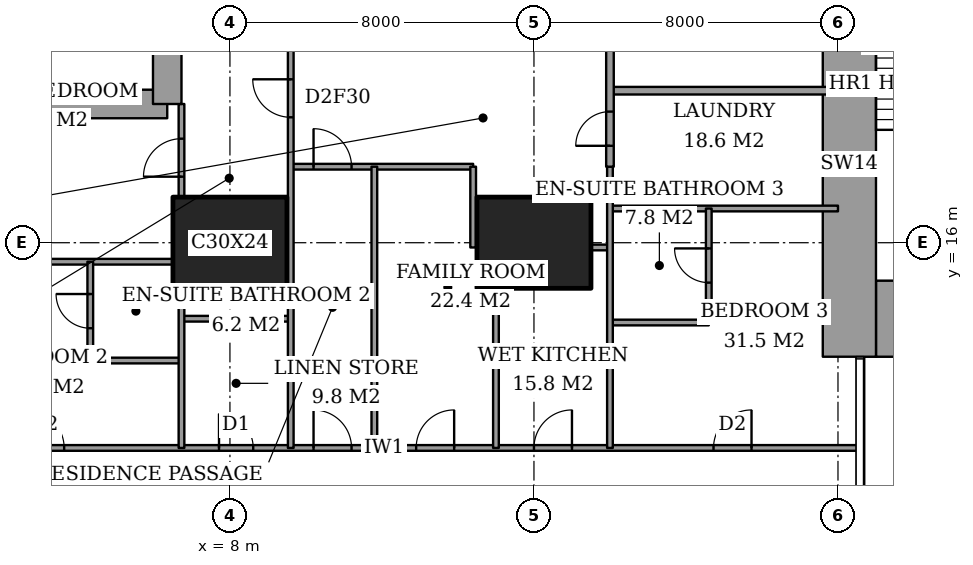
"""IFC4 building model, lengths in metres.
Left out: names, types, materials, properties, quantities, classifications, styles, units other than length and angle.
Written with IfcOpenShell. Run it as: python <this file> out.ifc"""

import sys

from ifc_helpers import new_model, si_unit, direction, frame, frame_2d, origin, origin_2d, place, context, subcontext, project, spatial, rectangle, extrude, element, fill, save


model = new_model("IFC4")
c1 = context("Model", 3, precision=1e-05, world=origin(), true_north=direction((0.0, 1.0)))
c2 = subcontext(c1, "Body", "Model", "MODEL_VIEW")
j1 = project(units=[si_unit("LENGTHUNIT", "METRE"), si_unit("PLANEANGLEUNIT", "RADIAN")], contexts=[c1])
p1 = place(None, origin())
s1 = spatial("IfcSite", under=j1, at=p1, CompositionType="ELEMENT")
p2 = place(p1, origin())
s2 = spatial("IfcBuilding", under=s1, at=p2, CompositionType="ELEMENT")
p3 = place(p2, frame((0.0, 0.0, 58.4)))
s3 = spatial("IfcBuildingStorey", under=s2, at=p3, CompositionType="ELEMENT", Elevation=58.4)
for number, where, z_axis, x_axis in (
    (1, (8.0, 16.0, 0.0), (0.0, 0.0, 1.0), (1.0, 0.0, 0.0)),
    (2, (16.0, 16.0, 0.0), (0.0, 0.0, 1.0), (1.0, 0.0, 0.0)),
):
    element("IfcColumn", number, at=place(p3, frame(where, z_axis=z_axis, x_axis=x_axis)), inside=s3, PredefinedType="COLUMN", context=c2, shape_type="SweptSolid", body=[
        extrude(rectangle(XDim=3.0, YDim=2.4, at=origin_2d()), origin(), (0.0, 0.0, 1.0), 3.6),
    ])
p4 = place(p3, frame((25.0, 14.0, 0.0), z_axis=(0.0, 0.0, 1.0), x_axis=(1.0, 0.0, 0.0)))
e3 = element("IfcWall", 3, at=p4, inside=s3, PredefinedType="SHEAR", context=c2, shape_type="SweptSolid", body=[
    extrude(rectangle(XDim=3.15, YDim=2.0, at=frame_2d((1.575, 0.0))), origin(), (0.0, 0.0, 1.0), 3.6),
])
p5 = place(p3, frame((24.3, 13.0, 0.0), z_axis=(0.0, 0.0, 1.0), x_axis=(0.0, 1.0, 0.0)))
e4 = element("IfcWall", 4, at=p5, inside=s3, PredefinedType="SHEAR", context=c2, shape_type="SweptSolid", body=[
    extrude(rectangle(XDim=10.15, YDim=1.4, at=frame_2d((5.075, 0.0))), origin(), (0.0, 0.0, 1.0), 3.6),
])
p6 = place(p3, frame((1.9, 19.65, 0.0), z_axis=(0.0, 0.0, 1.0), x_axis=(1.0, 0.0, 0.0)))
e5 = element("IfcWall", 5, at=p6, inside=s3, PredefinedType="SHEAR", context=c2, shape_type="SweptSolid", body=[
    extrude(rectangle(XDim=4.45, YDim=0.75, at=frame_2d((2.225, 0.0))), origin(), (0.0, 0.0, 1.0), 3.6),
])
p7 = place(p3, frame((6.35, 19.65, 0.0), z_axis=(0.0, 0.0, 1.0), x_axis=(0.0, 1.0, 0.0)))
e6 = element("IfcWall", 6, at=p7, inside=s3, PredefinedType="SHEAR", context=c2, shape_type="SweptSolid", body=[
    extrude(rectangle(XDim=8.7, YDim=0.75, at=frame_2d((4.35, 0.0))), origin(), (0.0, 0.0, 1.0), 3.6),
])
p8 = place(p7, frame((6.725, 0.0, 0.0)))
e7 = element("IfcOpeningElement", 7, at=p8, cuts=e6, PredefinedType="OPENING", context=c2, shape_type="SweptSolid", body=[
    extrude(rectangle(XDim=1.0, YDim=2.1, at=frame_2d((0.5, 1.05))), frame((0.0, 0.385, 0.0), z_axis=(0.0, -1.0, 0.0), x_axis=(1.0, 0.0, 0.0)), (0.0, 0.0, 1.0), 0.77),
])
p9 = place(p3, frame((-0.45, 10.6, 0.0), z_axis=(0.0, 0.0, 1.0), x_axis=(1.0, 0.0, 0.0)))
e8 = element("IfcWall", 8, at=p9, inside=s3, PredefinedType="PARTITIONING", context=c2, shape_type="SweptSolid", body=[
    extrude(rectangle(XDim=25.011, YDim=0.15, at=frame_2d((12.505, 0.0))), origin(), (0.0, 0.0, 1.0), 3.35),
])
p10 = place(p9, frame((10.65, 0.0, 0.0)))
e9 = element("IfcOpeningElement", 9, at=p10, cuts=e8, PredefinedType="OPENING", context=c2, shape_type="SweptSolid", body=[
    extrude(rectangle(XDim=1.0, YDim=2.1, at=frame_2d((0.5, 1.05))), frame((0.0, 0.085, 0.0), z_axis=(0.0, -1.0, 0.0), x_axis=(1.0, 0.0, 0.0)), (0.0, 0.0, 1.0), 0.17),
])
p11 = place(p9, frame((3.087, 0.0, 0.0)))
e10 = element("IfcOpeningElement", 10, at=p11, cuts=e8, PredefinedType="OPENING", context=c2, shape_type="SweptSolid", body=[
    extrude(rectangle(XDim=1.0, YDim=2.1, at=frame_2d((0.5, 1.05))), frame((0.0, 0.085, 0.0), z_axis=(0.0, -1.0, 0.0), x_axis=(1.0, 0.0, 0.0)), (0.0, 0.0, 1.0), 0.17),
])
p12 = place(p9, frame((8.163, 0.0, 0.0)))
e11 = element("IfcOpeningElement", 11, at=p12, cuts=e8, PredefinedType="OPENING", context=c2, shape_type="SweptSolid", body=[
    extrude(rectangle(XDim=0.9, YDim=2.1, at=frame_2d((0.45, 1.05))), frame((0.0, 0.085, 0.0), z_axis=(0.0, -1.0, 0.0), x_axis=(1.0, 0.0, 0.0)), (0.0, 0.0, 1.0), 0.17),
])
p13 = place(p9, frame((13.35, 0.0, 0.0)))
e12 = element("IfcOpeningElement", 12, at=p13, cuts=e8, PredefinedType="OPENING", context=c2, shape_type="SweptSolid", body=[
    extrude(rectangle(XDim=1.0, YDim=2.1, at=frame_2d((0.5, 1.05))), frame((0.0, 0.085, 0.0), z_axis=(0.0, -1.0, 0.0), x_axis=(1.0, 0.0, 0.0)), (0.0, 0.0, 1.0), 0.17),
])
p14 = place(p9, frame((16.45, 0.0, 0.0)))
e13 = element("IfcOpeningElement", 13, at=p14, cuts=e8, PredefinedType="OPENING", context=c2, shape_type="SweptSolid", body=[
    extrude(rectangle(XDim=1.0, YDim=2.1, at=frame_2d((0.5, 1.05))), frame((0.0, 0.085, 0.0), z_axis=(0.0, -1.0, 0.0), x_axis=(1.0, 0.0, 0.0)), (0.0, 0.0, 1.0), 0.17),
])
p15 = place(p9, frame((21.175, 0.0, 0.0)))
e14 = element("IfcOpeningElement", 14, at=p15, cuts=e8, PredefinedType="OPENING", context=c2, shape_type="SweptSolid", body=[
    extrude(rectangle(XDim=1.0, YDim=2.1, at=frame_2d((0.5, 1.05))), frame((0.0, 0.085, 0.0), z_axis=(0.0, -1.0, 0.0), x_axis=(1.0, 0.0, 0.0)), (0.0, 0.0, 1.0), 0.17),
])
p16 = place(p3, frame((4.325, 12.9, 0.0), z_axis=(0.0, 0.0, 1.0), x_axis=(1.0, 0.0, 0.0)))
e15 = element("IfcWall", 15, at=p16, inside=s3, PredefinedType="PARTITIONING", context=c2, shape_type="SweptSolid", body=[
    extrude(rectangle(XDim=2.4, YDim=0.15, at=frame_2d((1.2, 0.0))), origin(), (0.0, 0.0, 1.0), 3.35),
])
p17 = place(p3, frame((18.0, 13.9, 0.0), z_axis=(0.0, 0.0, 1.0), x_axis=(1.0, 0.0, 0.0)))
e16 = element("IfcWall", 16, at=p17, inside=s3, PredefinedType="PARTITIONING", context=c2, shape_type="SweptSolid", body=[
    extrude(rectangle(XDim=2.6, YDim=0.15, at=frame_2d((1.3, 0.0))), origin(), (0.0, 0.0, 1.0), 3.35),
])
p18 = place(p3, frame((6.725, 14.0, 0.0), z_axis=(0.0, 0.0, 1.0), x_axis=(1.0, 0.0, 0.0)))
e17 = element("IfcWall", 17, at=p18, inside=s3, PredefinedType="PARTITIONING", context=c2, shape_type="SweptSolid", body=[
    extrude(rectangle(XDim=2.875, YDim=0.15, at=frame_2d((1.438, 0.0))), origin(), (0.0, 0.0, 1.0), 3.35),
])
p19 = place(p3, frame((1.35, 15.5, 0.0), z_axis=(0.0, 0.0, 1.0), x_axis=(1.0, 0.0, 0.0)))
e18 = element("IfcWall", 18, at=p19, inside=s3, PredefinedType="PARTITIONING", context=c2, shape_type="SweptSolid", body=[
    extrude(rectangle(XDim=5.15, YDim=0.15, at=frame_2d((2.575, 0.0))), origin(), (0.0, 0.0, 1.0), 3.35),
])
p20 = place(p3, frame((17.5, 15.875, 0.0), z_axis=(0.0, 0.0, 1.0), x_axis=(1.0, 0.0, 0.0)))
e19 = element("IfcWall", 19, at=p20, inside=s3, PredefinedType="PARTITIONING", context=c2, shape_type="SweptSolid", body=[
    extrude(rectangle(XDim=0.5, YDim=0.15, at=frame_2d((0.25, 0.0))), origin(), (0.0, 0.0, 1.0), 2.634),
])
p21 = place(p3, frame((18.0, 16.9, 0.0), z_axis=(0.0, 0.0, 1.0), x_axis=(1.0, 0.0, 0.0)))
e20 = element("IfcWall", 20, at=p21, inside=s3, PredefinedType="PARTITIONING", context=c2, shape_type="SweptSolid", body=[
    extrude(rectangle(XDim=6.0, YDim=0.15, at=frame_2d((3.0, 0.0))), origin(), (0.0, 0.0, 1.0), 3.35),
])
p22 = place(p3, frame((9.6, 18.0, 0.0), z_axis=(0.0, 0.0, 1.0), x_axis=(1.0, 0.0, 0.0)))
e21 = element("IfcWall", 21, at=p22, inside=s3, PredefinedType="PARTITIONING", context=c2, shape_type="SweptSolid", body=[
    extrude(rectangle(XDim=4.8, YDim=0.15, at=frame_2d((2.4, 0.0))), origin(), (0.0, 0.0, 1.0), 3.35),
])
p23 = place(p22, frame((0.6, 0.0, 0.0)))
e22 = element("IfcOpeningElement", 22, at=p23, cuts=e21, PredefinedType="OPENING", context=c2, shape_type="SweptSolid", body=[
    extrude(rectangle(XDim=1.0, YDim=2.1, at=frame_2d((0.5, 1.05))), frame((0.0, 0.085, 0.0), z_axis=(0.0, -1.0, 0.0), x_axis=(1.0, 0.0, 0.0)), (0.0, 0.0, 1.0), 0.17),
])
p24 = place(p3, frame((18.0, 20.0, 0.0), z_axis=(0.0, 0.0, 1.0), x_axis=(1.0, 0.0, 0.0)))
e23 = element("IfcWall", 23, at=p24, inside=s3, PredefinedType="PARTITIONING", context=c2, shape_type="SweptSolid", body=[
    extrude(rectangle(XDim=6.0, YDim=0.2, at=frame_2d((3.0, 0.0))), origin(), (0.0, 0.0, 1.0), 3.35),
])
p25 = place(p3, frame((4.325, 12.9, 0.0), z_axis=(0.0, 0.0, 1.0), x_axis=(0.0, 1.0, 0.0)))
e24 = element("IfcWall", 24, at=p25, inside=s3, PredefinedType="PARTITIONING", context=c2, shape_type="SweptSolid", body=[
    extrude(rectangle(XDim=2.6, YDim=0.15, at=frame_2d((1.3, 0.0))), origin(), (0.0, 0.0, 1.0), 3.35),
])
p26 = place(p25, frame((0.85, 0.0, 0.0)))
e25 = element("IfcOpeningElement", 25, at=p26, cuts=e24, PredefinedType="OPENING", context=c2, shape_type="SweptSolid", body=[
    extrude(rectangle(XDim=0.9, YDim=2.1, at=frame_2d((0.45, 1.05))), frame((0.0, 0.085, 0.0), z_axis=(0.0, -1.0, 0.0), x_axis=(1.0, 0.0, 0.0)), (0.0, 0.0, 1.0), 0.17),
])
p27 = place(p3, frame((6.725, 10.6, 0.0), z_axis=(0.0, 0.0, 1.0), x_axis=(0.0, 1.0, 0.0)))
e26 = element("IfcWall", 26, at=p27, inside=s3, PredefinedType="PARTITIONING", context=c2, shape_type="SweptSolid", body=[
    extrude(rectangle(XDim=4.2, YDim=0.15, at=frame_2d((2.1, 0.0))), origin(), (0.0, 0.0, 1.0), 3.35),
])
p28 = place(p3, frame((6.725, 17.2, 0.0), z_axis=(0.0, 0.0, 1.0), x_axis=(0.0, 1.0, 0.0)))
e27 = element("IfcWall", 27, at=p28, inside=s3, PredefinedType="PARTITIONING", context=c2, shape_type="SweptSolid", body=[
    extrude(rectangle(XDim=2.45, YDim=0.15, at=frame_2d((1.225, 0.0))), origin(), (0.0, 0.0, 1.0), 3.35),
])
p29 = place(p28, frame((0.538, 0.0, 0.0)))
e28 = element("IfcOpeningElement", 28, at=p29, cuts=e27, PredefinedType="OPENING", context=c2, shape_type="SweptSolid", body=[
    extrude(rectangle(XDim=1.0, YDim=2.1, at=frame_2d((0.5, 1.05))), frame((0.0, 0.085, 0.0), z_axis=(0.0, -1.0, 0.0), x_axis=(1.0, 0.0, 0.0)), (0.0, 0.0, 1.0), 0.17),
])
p30 = place(p3, frame((9.6, 10.6, 0.0), z_axis=(0.0, 0.0, 1.0), x_axis=(0.0, 1.0, 0.0)))
e29 = element("IfcWall", 29, at=p30, inside=s3, PredefinedType="PARTITIONING", context=c2, shape_type="SweptSolid", body=[
    extrude(rectangle(XDim=11.0, YDim=0.15, at=frame_2d((5.5, 0.0))), origin(), (0.0, 0.0, 1.0), 3.35),
])
p31 = place(p30, frame((8.7, 0.0, 0.0)))
e30 = element("IfcOpeningElement", 30, at=p31, cuts=e29, PredefinedType="OPENING", context=c2, shape_type="SweptSolid", body=[
    extrude(rectangle(XDim=1.0, YDim=2.1, at=frame_2d((0.5, 1.05))), frame((0.0, 0.085, 0.0), z_axis=(0.0, -1.0, 0.0), x_axis=(1.0, 0.0, 0.0)), (0.0, 0.0, 1.0), 0.17),
])
p32 = place(p3, frame((11.8, 10.6, 0.0), z_axis=(0.0, 0.0, 1.0), x_axis=(0.0, 1.0, 0.0)))
e31 = element("IfcWall", 31, at=p32, inside=s3, PredefinedType="PARTITIONING", context=c2, shape_type="SweptSolid", body=[
    extrude(rectangle(XDim=7.4, YDim=0.15, at=frame_2d((3.7, 0.0))), origin(), (0.0, 0.0, 1.0), 3.35),
])
p33 = place(p3, frame((14.4, 15.875, 0.0), z_axis=(0.0, 0.0, 1.0), x_axis=(0.0, 1.0, 0.0)))
e32 = element("IfcWall", 32, at=p33, inside=s3, PredefinedType="PARTITIONING", context=c2, shape_type="SweptSolid", body=[
    extrude(rectangle(XDim=2.125, YDim=0.15, at=frame_2d((1.062, 0.0))), origin(), (0.0, 0.0, 1.0), 3.35),
])
p34 = place(p3, frame((15.0, 10.6, 0.0), z_axis=(0.0, 0.0, 1.0), x_axis=(0.0, 1.0, 0.0)))
e33 = element("IfcWall", 33, at=p34, inside=s3, PredefinedType="PARTITIONING", context=c2, shape_type="SweptSolid", body=[
    extrude(rectangle(XDim=4.2, YDim=0.15, at=frame_2d((2.1, 0.0))), origin(), (0.0, 0.0, 1.0), 3.35),
])
p35 = place(p3, frame((18.0, 18.0, 0.0), z_axis=(0.0, 0.0, 1.0), x_axis=(0.0, 1.0, 0.0)))
e34 = element("IfcWall", 34, at=p35, inside=s3, PredefinedType="PARTITIONING", context=c2, shape_type="SweptSolid", body=[
    extrude(rectangle(XDim=6.0, YDim=0.2, at=frame_2d((3.0, 0.0))), origin(), (0.0, 0.0, 1.0), 3.35),
])
p36 = place(p35, frame((3.4, 0.0, 0.0)))
e35 = element("IfcOpeningElement", 35, at=p36, cuts=e34, PredefinedType="OPENING", context=c2, shape_type="SweptSolid", body=[
    extrude(rectangle(XDim=1.2, YDim=2.4, at=frame_2d((0.6, 1.2))), frame((0.0, 0.11, 0.0), z_axis=(0.0, -1.0, 0.0), x_axis=(1.0, 0.0, 0.0)), (0.0, 0.0, 1.0), 0.22),
])
p37 = place(p35, frame((0.55, 0.0, 0.0)))
e36 = element("IfcOpeningElement", 36, at=p37, cuts=e34, PredefinedType="OPENING", context=c2, shape_type="SweptSolid", body=[
    extrude(rectangle(XDim=0.9, YDim=2.1, at=frame_2d((0.45, 1.05))), frame((0.0, 0.11, 0.0), z_axis=(0.0, -1.0, 0.0), x_axis=(1.0, 0.0, 0.0)), (0.0, 0.0, 1.0), 0.22),
])
p38 = place(p3, frame((18.0, 10.6, 0.0), z_axis=(0.0, 0.0, 1.0), x_axis=(0.0, 1.0, 0.0)))
e37 = element("IfcWall", 37, at=p38, inside=s3, PredefinedType="PARTITIONING", context=c2, shape_type="SweptSolid", body=[
    extrude(rectangle(XDim=7.4, YDim=0.15, at=frame_2d((3.7, 0.0))), origin(), (0.0, 0.0, 1.0), 3.35),
])
p39 = place(p3, frame((20.6, 13.9, 0.0), z_axis=(0.0, 0.0, 1.0), x_axis=(0.0, 1.0, 0.0)))
e38 = element("IfcWall", 38, at=p39, inside=s3, PredefinedType="PARTITIONING", context=c2, shape_type="SweptSolid", body=[
    extrude(rectangle(XDim=3.0, YDim=0.15, at=frame_2d((1.5, 0.0))), origin(), (0.0, 0.0, 1.0), 3.35),
])
p40 = place(p39, frame((1.05, 0.0, 0.0)))
e39 = element("IfcOpeningElement", 39, at=p40, cuts=e38, PredefinedType="OPENING", context=c2, shape_type="SweptSolid", body=[
    extrude(rectangle(XDim=0.9, YDim=2.1, at=frame_2d((0.45, 1.05))), frame((0.0, 0.085, 0.0), z_axis=(0.0, -1.0, 0.0), x_axis=(1.0, 0.0, 0.0)), (0.0, 0.0, 1.0), 0.17),
])
p41 = place(p10, origin())
e40 = element("IfcDoor", 40, at=p41, inside=s3, OperationType="SINGLE_SWING_RIGHT", PredefinedType="DOOR", context=c2, shape_type="SweptSolid", body=[
    extrude(rectangle(XDim=1.0, YDim=2.1, at=frame_2d((0.5, 1.05))), frame((0.0, 0.025, 0.0), z_axis=(0.0, -1.0, 0.0), x_axis=(1.0, 0.0, 0.0)), (0.0, 0.0, 1.0), 0.05),
])
fill(e9, e40)
p42 = place(p26, origin())
e41 = element("IfcDoor", 41, at=p42, inside=s3, OperationType="SINGLE_SWING_LEFT", PredefinedType="DOOR", context=c2, shape_type="SweptSolid", body=[
    extrude(rectangle(XDim=0.9, YDim=2.1, at=frame_2d((0.45, 1.05))), frame((0.0, 0.025, 0.0), z_axis=(0.0, -1.0, 0.0), x_axis=(1.0, 0.0, 0.0)), (0.0, 0.0, 1.0), 0.05),
])
fill(e25, e41)
p43 = place(p11, origin())
e42 = element("IfcDoor", 42, at=p43, inside=s3, OperationType="SINGLE_SWING_RIGHT", PredefinedType="DOOR", context=c2, shape_type="SweptSolid", body=[
    extrude(rectangle(XDim=1.0, YDim=2.1, at=frame_2d((0.5, 1.05))), frame((0.0, 0.025, 0.0), z_axis=(0.0, -1.0, 0.0), x_axis=(1.0, 0.0, 0.0)), (0.0, 0.0, 1.0), 0.05),
])
fill(e10, e42)
p44 = place(p29, origin())
e43 = element("IfcDoor", 43, at=p44, inside=s3, OperationType="SINGLE_SWING_RIGHT", PredefinedType="DOOR", context=c2, shape_type="SweptSolid", body=[
    extrude(rectangle(XDim=1.0, YDim=2.1, at=frame_2d((0.5, 1.05))), frame((0.0, 0.025, 0.0), z_axis=(0.0, -1.0, 0.0), x_axis=(1.0, 0.0, 0.0)), (0.0, 0.0, 1.0), 0.05),
])
fill(e28, e43)
p45 = place(p12, origin())
e44 = element("IfcDoor", 44, at=p45, inside=s3, OperationType="SINGLE_SWING_RIGHT", PredefinedType="DOOR", context=c2, shape_type="SweptSolid", body=[
    extrude(rectangle(XDim=0.9, YDim=2.1, at=frame_2d((0.45, 1.05))), frame((0.0, 0.025, 0.0), z_axis=(0.0, -1.0, 0.0), x_axis=(1.0, 0.0, 0.0)), (0.0, 0.0, 1.0), 0.05),
])
fill(e11, e44)
p46 = place(p31, origin())
e45 = element("IfcDoor", 45, at=p46, inside=s3, OperationType="SINGLE_SWING_LEFT", PredefinedType="DOOR", context=c2, shape_type="SweptSolid", body=[
    extrude(rectangle(XDim=1.0, YDim=2.1, at=frame_2d((0.5, 1.05))), frame((0.0, 0.025, 0.0), z_axis=(0.0, -1.0, 0.0), x_axis=(1.0, 0.0, 0.0)), (0.0, 0.0, 1.0), 0.05),
])
fill(e30, e45)
p47 = place(p23, origin())
e46 = element("IfcDoor", 46, at=p47, inside=s3, OperationType="SINGLE_SWING_RIGHT", PredefinedType="DOOR", context=c2, shape_type="SweptSolid", body=[
    extrude(rectangle(XDim=1.0, YDim=2.1, at=frame_2d((0.5, 1.05))), frame((0.0, 0.025, 0.0), z_axis=(0.0, -1.0, 0.0), x_axis=(1.0, 0.0, 0.0)), (0.0, 0.0, 1.0), 0.05),
])
fill(e22, e46)
p48 = place(p13, origin())
e47 = element("IfcDoor", 47, at=p48, inside=s3, OperationType="SINGLE_SWING_LEFT", PredefinedType="DOOR", context=c2, shape_type="SweptSolid", body=[
    extrude(rectangle(XDim=1.0, YDim=2.1, at=frame_2d((0.5, 1.05))), frame((0.0, 0.025, 0.0), z_axis=(0.0, -1.0, 0.0), x_axis=(1.0, 0.0, 0.0)), (0.0, 0.0, 1.0), 0.05),
])
fill(e12, e47)
p49 = place(p14, origin())
e48 = element("IfcDoor", 48, at=p49, inside=s3, OperationType="SINGLE_SWING_LEFT", PredefinedType="DOOR", context=c2, shape_type="SweptSolid", body=[
    extrude(rectangle(XDim=1.0, YDim=2.1, at=frame_2d((0.5, 1.05))), frame((0.0, 0.025, 0.0), z_axis=(0.0, -1.0, 0.0), x_axis=(1.0, 0.0, 0.0)), (0.0, 0.0, 1.0), 0.05),
])
fill(e13, e48)
p50 = place(p40, origin())
e49 = element("IfcDoor", 49, at=p50, inside=s3, OperationType="SINGLE_SWING_LEFT", PredefinedType="DOOR", context=c2, shape_type="SweptSolid", body=[
    extrude(rectangle(XDim=0.9, YDim=2.1, at=frame_2d((0.45, 1.05))), frame((0.0, 0.025, 0.0), z_axis=(0.0, -1.0, 0.0), x_axis=(1.0, 0.0, 0.0)), (0.0, 0.0, 1.0), 0.05),
])
fill(e39, e49)
p51 = place(p15, origin())
e50 = element("IfcDoor", 50, at=p51, inside=s3, OperationType="SINGLE_SWING_LEFT", PredefinedType="DOOR", context=c2, shape_type="SweptSolid", body=[
    extrude(rectangle(XDim=1.0, YDim=2.1, at=frame_2d((0.5, 1.05))), frame((0.0, 0.025, 0.0), z_axis=(0.0, -1.0, 0.0), x_axis=(1.0, 0.0, 0.0)), (0.0, 0.0, 1.0), 0.05),
])
fill(e14, e50)
p52 = place(p37, origin())
e51 = element("IfcDoor", 51, at=p52, inside=s3, OperationType="SINGLE_SWING_RIGHT", PredefinedType="DOOR", context=c2, shape_type="SweptSolid", body=[
    extrude(rectangle(XDim=0.9, YDim=2.1, at=frame_2d((0.45, 1.05))), frame((0.0, 0.025, 0.0), z_axis=(0.0, -1.0, 0.0), x_axis=(1.0, 0.0, 0.0)), (0.0, 0.0, 1.0), 0.05),
])
fill(e36, e51)
save(model, sys.argv[1])
